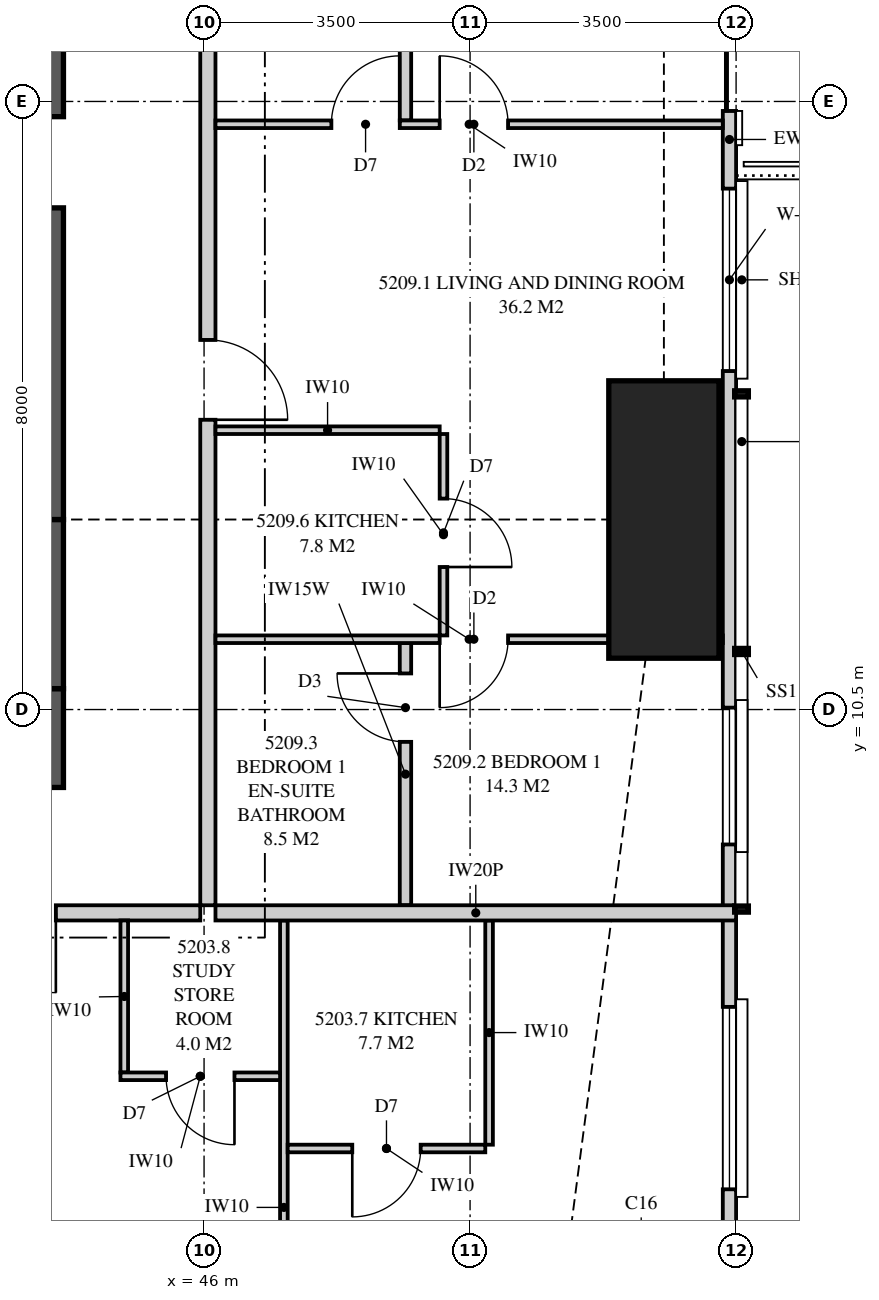
"""IFC4 building model, lengths in metres.
Left out: names, types, materials, properties, quantities, classifications, styles, units other than length and angle.
Written with IfcOpenShell. Run it as: python <this file> out.ifc"""

import sys

from ifc_helpers import new_model, si_unit, direction, frame, frame_2d, origin, origin_2d, place, context, subcontext, project, spatial, polyline, rectangle, outline, extrude, element, fill, save


model = new_model("IFC4")
c1 = context("Model", 3, precision=1e-05, world=origin(), true_north=direction((0.0, 1.0)))
c2 = subcontext(c1, "Body", "Model", "MODEL_VIEW")
j1 = project(units=[si_unit("LENGTHUNIT", "METRE"), si_unit("PLANEANGLEUNIT", "RADIAN")], contexts=[c1])
p1 = place(None, origin())
s1 = spatial("IfcSite", under=j1, at=p1, CompositionType="ELEMENT")
p2 = place(p1, origin())
s2 = spatial("IfcBuilding", under=s1, at=p2, CompositionType="ELEMENT")
p3 = place(p2, frame((0.0, 0.0, 191.2)))
s3 = spatial("IfcBuildingStorey", under=s2, at=p3, CompositionType="ELEMENT", Elevation=191.2)
p4 = place(p3, frame((52.05, 13.0, 0.0), z_axis=(0.0, 0.0, 1.0), x_axis=(1.0, 0.0, 0.0)))
e1 = element("IfcColumn", 1, at=p4, inside=s3, PredefinedType="COLUMN", context=c2, shape_type="SweptSolid", body=[
    extrude(rectangle(XDim=1.45, YDim=3.65, at=origin_2d()), origin(), (0.0, 0.0, 1.0), 3.35),
])
p5 = place(p3, frame((35.9, 10.125, 0.0), z_axis=(0.0, 0.0, 1.0), x_axis=(1.0, 0.0, 0.0)))
e2 = element("IfcWall", 2, at=p5, inside=s3, PredefinedType="SHEAR", context=c2, shape_type="SweptSolid", body=[
    extrude(rectangle(XDim=8.25, YDim=1.3, at=frame_2d((4.125, 0.0))), origin(), (0.0, 0.0, 1.0), 3.35),
])
p6 = place(p5, frame((2.7, 0.0, 0.0)))
e3 = element("IfcOpeningElement", 3, at=p6, cuts=e2, PredefinedType="OPENING", context=c2, shape_type="SweptSolid", body=[
    extrude(rectangle(XDim=1.0, YDim=2.1, at=frame_2d((0.5, 1.05))), frame((0.0, 0.66, 0.0), z_axis=(0.0, -1.0, 0.0), x_axis=(1.0, 0.0, 0.0)), (0.0, 0.0, 1.0), 1.32),
])
p7 = place(p3, frame((43.8, 10.775, 0.0), z_axis=(0.0, 0.0, 1.0), x_axis=(0.0, 1.0, 0.0)))
e4 = element("IfcWall", 4, at=p7, inside=s3, PredefinedType="SHEAR", context=c2, shape_type="SweptSolid", body=[
    extrude(rectangle(XDim=2.225, YDim=0.7, at=frame_2d((1.113, 0.0))), origin(), (0.0, 0.0, 1.0), 3.35),
])
p8 = place(p3, frame((43.8, 13.0, 0.0), z_axis=(0.0, 0.0, 1.0), x_axis=(0.0, 1.0, 0.0)))
e5 = element("IfcWall", 5, at=p8, inside=s3, PredefinedType="SHEAR", context=c2, shape_type="SweptSolid", body=[
    extrude(rectangle(XDim=6.3, YDim=0.7, at=frame_2d((3.15, 0.0))), origin(), (0.0, 0.0, 1.0), 3.35),
])
p9 = place(p8, frame((4.1, 0.0, 0.0)))
e6 = element("IfcOpeningElement", 6, at=p9, cuts=e5, PredefinedType="OPENING", context=c2, shape_type="SweptSolid", body=[
    extrude(rectangle(XDim=1.2, YDim=2.2, at=frame_2d((0.6, 1.1))), frame((0.0, 0.36, 0.0), z_axis=(0.0, -1.0, 0.0), x_axis=(1.0, 0.0, 0.0)), (0.0, 0.0, 1.0), 0.72),
])
p10 = place(p3, frame((52.913, 3.051, 0.0), z_axis=(0.0, 0.0, 1.0), x_axis=(0.0, 1.0, 0.0)))
e7 = element("IfcWall", 7, at=p10, inside=s3, PredefinedType="SOLIDWALL", context=c2, shape_type="SweptSolid", body=[
    extrude(outline(polyline([(0.0, 0.0), (29.897, 0.0), (29.897, 3.11), (22.167, 3.11), (22.167, 2.15), (22.074, 2.15), (22.074, 3.11), (21.949, 3.11), (21.949, 2.15), (9.949, 2.15), (9.949, 3.11), (9.847, 3.11), (9.847, 2.15), (9.706, 2.15), (9.706, 3.11), (0.0, 3.11), (0.0, 0.0)])), frame((0.0, 0.087, 0.0), z_axis=(0.0, -1.0, 0.0), x_axis=(1.0, 0.0, 0.0)), (0.0, 0.0, 1.0), 0.175),
])
p11 = place(p10, frame((1.137, 0.0, 0.4)))
e8 = element("IfcOpeningElement", 8, at=p11, cuts=e7, PredefinedType="OPENING", context=c2, shape_type="SweptSolid", body=[
    extrude(rectangle(XDim=2.4, YDim=1.7, at=frame_2d((1.2, 0.85))), frame((0.0, 0.097, 0.0), z_axis=(0.0, -1.0, 0.0), x_axis=(1.0, 0.0, 0.0)), (0.0, 0.0, 1.0), 0.195),
])
p12 = place(p10, frame((5.674, 0.0, 0.4)))
e9 = element("IfcOpeningElement", 9, at=p12, cuts=e7, PredefinedType="OPENING", context=c2, shape_type="SweptSolid", body=[
    extrude(rectangle(XDim=1.8, YDim=1.7, at=frame_2d((0.9, 0.85))), frame((0.0, 0.097, 0.0), z_axis=(0.0, -1.0, 0.0), x_axis=(1.0, 0.0, 0.0)), (0.0, 0.0, 1.0), 0.195),
])
p13 = place(p10, frame((11.902, 0.0, 0.4)))
e10 = element("IfcOpeningElement", 10, at=p13, cuts=e7, PredefinedType="OPENING", context=c2, shape_type="SweptSolid", body=[
    extrude(rectangle(XDim=2.4, YDim=1.7, at=frame_2d((1.2, 0.85))), frame((0.0, 0.097, 0.0), z_axis=(0.0, -1.0, 0.0), x_axis=(1.0, 0.0, 0.0)), (0.0, 0.0, 1.0), 0.195),
])
p14 = place(p10, frame((15.324, 0.0, 0.0)))
e11 = element("IfcOpeningElement", 11, at=p14, cuts=e7, PredefinedType="OPENING", context=c2, shape_type="SweptSolid", body=[
    extrude(rectangle(XDim=1.8, YDim=2.1, at=frame_2d((0.9, 1.05))), frame((0.0, 0.097, 0.0), z_axis=(0.0, -1.0, 0.0), x_axis=(1.0, 0.0, 0.0)), (0.0, 0.0, 1.0), 0.195),
])
p15 = place(p10, frame((23.874, 0.0, 0.4)))
e12 = element("IfcOpeningElement", 12, at=p15, cuts=e7, PredefinedType="OPENING", context=c2, shape_type="SweptSolid", body=[
    extrude(rectangle(XDim=1.8, YDim=1.7, at=frame_2d((0.9, 0.85))), frame((0.0, 0.097, 0.0), z_axis=(0.0, -1.0, 0.0), x_axis=(1.0, 0.0, 0.0)), (0.0, 0.0, 1.0), 0.195),
])
p16 = place(p10, frame((26.871, 0.0, 0.4)))
e13 = element("IfcOpeningElement", 13, at=p16, cuts=e7, PredefinedType="OPENING", context=c2, shape_type="SweptSolid", body=[
    extrude(rectangle(XDim=1.8, YDim=1.7, at=frame_2d((0.9, 0.85))), frame((0.0, 0.097, 0.0), z_axis=(0.0, -1.0, 0.0), x_axis=(1.0, 0.0, 0.0)), (0.0, 0.0, 1.0), 0.195),
])
p17 = place(p3, frame((34.1, 7.825, 0.0), z_axis=(0.0, 0.0, 1.0), x_axis=(1.0, 0.0, 0.0)))
e14 = element("IfcWall", 14, at=p17, inside=s3, PredefinedType="PARTITIONING", context=c2, shape_type="SweptSolid", body=[
    extrude(outline(polyline([(0.0, 0.0), (11.85, 0.0), (11.85, 3.11), (8.987, 3.11), (8.987, 2.541), (8.312, 2.541), (8.312, 3.11), (0.0, 3.11), (0.0, 0.0)])), frame((0.0, 0.1, 0.0), z_axis=(0.0, -1.0, 0.0), x_axis=(1.0, 0.0, 0.0)), (0.0, 0.0, 1.0), 0.2),
])
p18 = place(p17, frame((8.9, 0.0, 0.0)))
e15 = element("IfcOpeningElement", 15, at=p18, cuts=e14, PredefinedType="OPENING", context=c2, shape_type="SweptSolid", body=[
    extrude(rectangle(XDim=1.05, YDim=2.2, at=frame_2d((0.525, 1.1))), frame((0.0, 0.11, 0.0), z_axis=(0.0, -1.0, 0.0), x_axis=(1.0, 0.0, 0.0)), (0.0, 0.0, 1.0), 0.22),
])
p19 = place(p3, frame((47.05, 0.175, 0.0), z_axis=(0.0, 0.0, 1.0), x_axis=(0.0, 1.0, 0.0)))
e16 = element("IfcWall", 16, at=p19, inside=s3, PredefinedType="PARTITIONING", context=c2, shape_type="SweptSolid", body=[
    extrude(outline(polyline([(0.0, 0.0), (7.55, 0.0), (7.55, 3.11), (2.409, 3.11), (2.409, 2.15), (0.663, 2.15), (0.663, 3.11), (0.0, 3.11), (0.0, 0.0)])), frame((0.0, 0.05, 0.0), z_axis=(0.0, -1.0, 0.0), x_axis=(1.0, 0.0, 0.0)), (0.0, 0.0, 1.0), 0.1),
])
p20 = place(p19, frame((1.825, 0.0, 0.0)))
e17 = element("IfcOpeningElement", 17, at=p20, cuts=e16, PredefinedType="OPENING", context=c2, shape_type="SweptSolid", body=[
    extrude(rectangle(XDim=0.9, YDim=2.1, at=frame_2d((0.45, 1.05))), frame((0.0, 0.06, 0.0), z_axis=(0.0, -1.0, 0.0), x_axis=(1.0, 0.0, 0.0)), (0.0, 0.0, 1.0), 0.12),
])
p21 = place(p3, frame((47.1, 4.725, 0.0), z_axis=(0.0, 0.0, 1.0), x_axis=(1.0, 0.0, 0.0)))
e18 = element("IfcWall", 18, at=p21, inside=s3, PredefinedType="PARTITIONING", context=c2, shape_type="SweptSolid", body=[
    extrude(rectangle(XDim=2.6, YDim=0.1, at=frame_2d((1.3, 0.0))), origin(), (0.0, 0.0, 1.0), 3.11),
])
p22 = place(p21, frame((0.85, 0.0, 0.0)))
e19 = element("IfcOpeningElement", 19, at=p22, cuts=e18, PredefinedType="OPENING", context=c2, shape_type="SweptSolid", body=[
    extrude(rectangle(XDim=0.9, YDim=2.1, at=frame_2d((0.45, 1.05))), frame((0.0, 0.06, 0.0), z_axis=(0.0, -1.0, 0.0), x_axis=(1.0, 0.0, 0.0)), (0.0, 0.0, 1.0), 0.12),
])
p23 = place(p3, frame((49.75, 4.775, 0.0), z_axis=(0.0, 0.0, 1.0), x_axis=(0.0, 1.0, 0.0)))
e20 = element("IfcWall", 20, at=p23, inside=s3, PredefinedType="PARTITIONING", context=c2, shape_type="SweptSolid", body=[
    extrude(rectangle(XDim=2.95, YDim=0.1, at=frame_2d((1.475, 0.0))), origin(), (0.0, 0.0, 1.0), 3.11),
])
p24 = place(p3, frame((46.15, 7.825, 0.0), z_axis=(0.0, 0.0, 1.0), x_axis=(1.0, 0.0, 0.0)))
e21 = element("IfcWall", 21, at=p24, inside=s3, PredefinedType="PARTITIONING", context=c2, shape_type="SweptSolid", body=[
    extrude(outline(polyline([(0.0, 0.0), (6.85, 0.0), (6.85, 3.11), (6.138, 3.11), (6.138, 2.15), (4.303, 2.15), (4.303, 3.11), (0.0, 3.11), (0.0, 0.0)])), frame((0.0, 0.1, 0.0), z_axis=(0.0, -1.0, 0.0), x_axis=(1.0, 0.0, 0.0)), (0.0, 0.0, 1.0), 0.2),
])
p25 = place(p3, frame((46.05, 7.925, 0.0), z_axis=(0.0, 0.0, 1.0), x_axis=(0.0, 1.0, 0.0)))
e22 = element("IfcWall", 22, at=p25, inside=s3, PredefinedType="PARTITIONING", context=c2, shape_type="SweptSolid", body=[
    extrude(outline(polyline([(0.0, 0.0), (13.775, 0.0), (13.775, 3.11), (5.412, 3.11), (5.412, 2.541), (4.738, 2.541), (4.738, 3.11), (0.0, 3.11), (0.0, 0.0)])), frame((0.0, 0.1, 0.0), z_axis=(0.0, -1.0, 0.0), x_axis=(1.0, 0.0, 0.0)), (0.0, 0.0, 1.0), 0.2),
])
p26 = place(p25, frame((6.387, 0.0, 0.0)))
e23 = element("IfcOpeningElement", 23, at=p26, cuts=e22, PredefinedType="OPENING", context=c2, shape_type="SweptSolid", body=[
    extrude(rectangle(XDim=1.05, YDim=2.2, at=frame_2d((0.525, 1.1))), frame((0.0, 0.11, 0.0), z_axis=(0.0, -1.0, 0.0), x_axis=(1.0, 0.0, 0.0)), (0.0, 0.0, 1.0), 0.22),
])
p27 = place(p3, frame((52.825, 11.425, 0.0), z_axis=(0.0, 0.0, 1.0), x_axis=(-1.0, 0.0, 0.0)))
e24 = element("IfcWall", 24, at=p27, inside=s3, PredefinedType="PARTITIONING", context=c2, shape_type="SweptSolid", body=[
    extrude(outline(polyline([(0.0, 0.0), (6.675, 0.0), (6.675, 3.11), (1.849, 3.11), (1.849, 2.15), (0.115, 2.15), (0.115, 3.11), (0.0, 3.11), (0.0, 0.0)])), frame((0.0, 0.05, 0.0), z_axis=(0.0, -1.0, 0.0), x_axis=(1.0, 0.0, 0.0)), (0.0, 0.0, 1.0), 0.1),
])
p28 = place(p27, frame((2.825, 0.0, 0.0)))
e25 = element("IfcOpeningElement", 25, at=p28, cuts=e24, PredefinedType="OPENING", context=c2, shape_type="SweptSolid", body=[
    extrude(rectangle(XDim=0.9, YDim=2.1, at=frame_2d((0.45, 1.05))), frame((0.0, 0.06, 0.0), z_axis=(0.0, -1.0, 0.0), x_axis=(1.0, 0.0, 0.0)), (0.0, 0.0, 1.0), 0.12),
])
p29 = place(p3, frame((52.825, 18.2, 0.0), z_axis=(0.0, 0.0, 1.0), x_axis=(-1.0, 0.0, 0.0)))
e26 = element("IfcWall", 26, at=p29, inside=s3, PredefinedType="PARTITIONING", context=c2, shape_type="SweptSolid", body=[
    extrude(outline(polyline([(0.0, 0.0), (6.675, 0.0), (6.675, 3.11), (1.635, 3.11), (1.635, 2.15), (0.0, 2.15), (0.0, 3.11), (0.0, 0.0)])), frame((0.0, 0.05, 0.0), z_axis=(0.0, -1.0, 0.0), x_axis=(1.0, 0.0, 0.0)), (0.0, 0.0, 1.0), 0.1),
])
p30 = place(p29, frame((2.825, 0.0, 0.0)))
e27 = element("IfcOpeningElement", 27, at=p30, cuts=e26, PredefinedType="OPENING", context=c2, shape_type="SweptSolid", body=[
    extrude(rectangle(XDim=0.9, YDim=2.1, at=frame_2d((0.45, 1.05))), frame((0.0, 0.06, 0.0), z_axis=(0.0, -1.0, 0.0), x_axis=(1.0, 0.0, 0.0)), (0.0, 0.0, 1.0), 0.12),
])
p31 = place(p29, frame((4.25, 0.0, 0.0)))
e28 = element("IfcOpeningElement", 28, at=p31, cuts=e26, PredefinedType="OPENING", context=c2, shape_type="SweptSolid", body=[
    extrude(rectangle(XDim=0.9, YDim=2.1, at=frame_2d((0.45, 1.05))), frame((0.0, 0.06, 0.0), z_axis=(0.0, -1.0, 0.0), x_axis=(1.0, 0.0, 0.0)), (0.0, 0.0, 1.0), 0.12),
])
p32 = place(p3, frame((48.65, 7.925, 0.0), z_axis=(0.0, 0.0, 1.0), x_axis=(0.0, 1.0, 0.0)))
e29 = element("IfcWall", 29, at=p32, inside=s3, PredefinedType="PLUMBINGWALL", context=c2, shape_type="SweptSolid", body=[
    extrude(rectangle(XDim=3.45, YDim=0.15, at=frame_2d((1.725, 0.0))), origin(), (0.0, 0.0, 1.0), 3.11),
])
p33 = place(p32, frame((2.15, 0.0, 0.0)))
e30 = element("IfcOpeningElement", 30, at=p33, cuts=e29, PredefinedType="OPENING", context=c2, shape_type="SweptSolid", body=[
    extrude(rectangle(XDim=0.9, YDim=2.1, at=frame_2d((0.45, 1.05))), frame((0.0, 0.085, 0.0), z_axis=(0.0, -1.0, 0.0), x_axis=(1.0, 0.0, 0.0)), (0.0, 0.0, 1.0), 0.17),
])
p34 = place(p3, frame((48.65, 18.25, 0.0), z_axis=(0.0, 0.0, 1.0), x_axis=(0.0, 1.0, 0.0)))
e31 = element("IfcWall", 31, at=p34, inside=s3, PredefinedType="PLUMBINGWALL", context=c2, shape_type="SweptSolid", body=[
    extrude(rectangle(XDim=3.45, YDim=0.15, at=frame_2d((1.725, 0.0))), origin(), (0.0, 0.0, 1.0), 3.11),
])
p35 = place(p3, frame((49.15, 11.475, 0.0), z_axis=(0.0, 0.0, 1.0), x_axis=(0.0, 1.0, 0.0)))
e32 = element("IfcWall", 32, at=p35, inside=s3, PredefinedType="PARTITIONING", context=c2, shape_type="SweptSolid", body=[
    extrude(outline(polyline([(0.0, 0.0), (2.65, 0.0), (2.65, 3.11), (1.812, 3.11), (1.812, 2.541), (1.238, 2.541), (1.238, 3.11), (0.0, 3.11), (0.0, 0.0)])), frame((0.0, 0.05, 0.0), z_axis=(0.0, -1.0, 0.0), x_axis=(1.0, 0.0, 0.0)), (0.0, 0.0, 1.0), 0.1),
])
p36 = place(p35, frame((0.9, 0.0, 0.0)))
e33 = element("IfcOpeningElement", 33, at=p36, cuts=e32, PredefinedType="OPENING", context=c2, shape_type="SweptSolid", body=[
    extrude(rectangle(XDim=0.9, YDim=2.1, at=frame_2d((0.45, 1.05))), frame((0.0, 0.06, 0.0), z_axis=(0.0, -1.0, 0.0), x_axis=(1.0, 0.0, 0.0)), (0.0, 0.0, 1.0), 0.12),
])
p37 = place(p3, frame((49.1, 14.175, 0.0), z_axis=(0.0, 0.0, 1.0), x_axis=(-1.0, 0.0, 0.0)))
e34 = element("IfcWall", 34, at=p37, inside=s3, PredefinedType="PARTITIONING", context=c2, shape_type="SweptSolid", body=[
    extrude(rectangle(XDim=2.95, YDim=0.1, at=frame_2d((1.475, 0.0))), origin(), (0.0, 0.0, 1.0), 3.11),
])
p38 = place(p3, frame((47.0, 5.675, 0.0), z_axis=(0.0, 0.0, 1.0), x_axis=(-1.0, 0.0, 0.0)))
e35 = element("IfcWall", 35, at=p38, inside=s3, PredefinedType="PARTITIONING", context=c2, shape_type="SweptSolid", body=[
    extrude(rectangle(XDim=2.1, YDim=0.1, at=frame_2d((1.05, 0.0))), origin(), (0.0, 0.0, 1.0), 3.11),
])
p39 = place(p38, frame((0.6, 0.0, 0.0)))
e36 = element("IfcOpeningElement", 36, at=p39, cuts=e35, PredefinedType="OPENING", context=c2, shape_type="SweptSolid", body=[
    extrude(rectangle(XDim=0.9, YDim=2.1, at=frame_2d((0.45, 1.05))), frame((0.0, 0.06, 0.0), z_axis=(0.0, -1.0, 0.0), x_axis=(1.0, 0.0, 0.0)), (0.0, 0.0, 1.0), 0.12),
])
p40 = place(p3, frame((44.95, 7.725, 0.0), z_axis=(0.0, 0.0, 1.0), x_axis=(0.0, -1.0, 0.0)))
e37 = element("IfcWall", 37, at=p40, inside=s3, PredefinedType="PARTITIONING", context=c2, shape_type="SweptSolid", body=[
    extrude(rectangle(XDim=2.0, YDim=0.1, at=frame_2d((1.0, 0.0))), origin(), (0.0, 0.0, 1.0), 3.11),
])
p41 = place(p11, origin())
e38 = element("IfcWindow", 38, at=p41, inside=s3, PartitioningType="SINGLE_PANEL", PredefinedType="WINDOW", context=c2, shape_type="SweptSolid", body=[
    extrude(rectangle(XDim=2.4, YDim=1.7, at=frame_2d((1.2, 0.85))), frame((0.0, 0.03, 0.0), z_axis=(0.0, -1.0, 0.0), x_axis=(1.0, 0.0, 0.0)), (0.0, 0.0, 1.0), 0.06),
])
fill(e8, e38)
p42 = place(p12, origin())
e39 = element("IfcWindow", 39, at=p42, inside=s3, PartitioningType="SINGLE_PANEL", PredefinedType="WINDOW", context=c2, shape_type="SweptSolid", body=[
    extrude(rectangle(XDim=1.8, YDim=1.7, at=frame_2d((0.9, 0.85))), frame((0.0, 0.03, 0.0), z_axis=(0.0, -1.0, 0.0), x_axis=(1.0, 0.0, 0.0)), (0.0, 0.0, 1.0), 0.06),
])
fill(e9, e39)
p43 = place(p13, origin())
e40 = element("IfcWindow", 40, at=p43, inside=s3, PartitioningType="SINGLE_PANEL", PredefinedType="WINDOW", context=c2, shape_type="SweptSolid", body=[
    extrude(rectangle(XDim=2.4, YDim=1.7, at=frame_2d((1.2, 0.85))), frame((0.0, 0.03, 0.0), z_axis=(0.0, -1.0, 0.0), x_axis=(1.0, 0.0, 0.0)), (0.0, 0.0, 1.0), 0.06),
])
fill(e10, e40)
p44 = place(p14, origin())
e41 = element("IfcDoor", 41, at=p44, inside=s3, OperationType="SLIDING_TO_LEFT", PredefinedType="DOOR", context=c2, shape_type="SweptSolid", body=[
    extrude(rectangle(XDim=1.8, YDim=2.1, at=frame_2d((0.9, 1.05))), frame((0.0, 0.025, 0.0), z_axis=(0.0, -1.0, 0.0), x_axis=(1.0, 0.0, 0.0)), (0.0, 0.0, 1.0), 0.05),
])
fill(e11, e41)
p45 = place(p18, frame((1.05, 0.0, 0.0), z_axis=(0.0, 0.0, 1.0), x_axis=(-1.0, 0.0, 0.0)))
e42 = element("IfcDoor", 42, at=p45, inside=s3, OperationType="SINGLE_SWING_LEFT", PredefinedType="DOOR", context=c2, shape_type="SweptSolid", body=[
    extrude(rectangle(XDim=1.05, YDim=2.2, at=frame_2d((0.525, 1.1))), frame((0.0, 0.025, 0.0), z_axis=(0.0, -1.0, 0.0), x_axis=(1.0, 0.0, 0.0)), (0.0, 0.0, 1.0), 0.05),
])
fill(e15, e42)
p46 = place(p22, frame((0.9, 0.0, 0.0), z_axis=(0.0, 0.0, 1.0), x_axis=(-1.0, 0.0, 0.0)))
e43 = element("IfcDoor", 43, at=p46, inside=s3, OperationType="SINGLE_SWING_RIGHT", PredefinedType="DOOR", context=c2, shape_type="SweptSolid", body=[
    extrude(rectangle(XDim=0.9, YDim=2.1, at=frame_2d((0.45, 1.05))), frame((0.0, 0.025, 0.0), z_axis=(0.0, -1.0, 0.0), x_axis=(1.0, 0.0, 0.0)), (0.0, 0.0, 1.0), 0.05),
])
fill(e19, e43)
p47 = place(p26, frame((1.05, 0.0, 0.0), z_axis=(0.0, 0.0, 1.0), x_axis=(-1.0, 0.0, 0.0)))
e44 = element("IfcDoor", 44, at=p47, inside=s3, OperationType="SINGLE_SWING_RIGHT", PredefinedType="DOOR", context=c2, shape_type="SweptSolid", body=[
    extrude(rectangle(XDim=1.05, YDim=2.2, at=frame_2d((0.525, 1.1))), frame((0.0, 0.025, 0.0), z_axis=(0.0, -1.0, 0.0), x_axis=(1.0, 0.0, 0.0)), (0.0, 0.0, 1.0), 0.05),
])
fill(e23, e44)
p48 = place(p28, origin())
e45 = element("IfcDoor", 45, at=p48, inside=s3, OperationType="SINGLE_SWING_RIGHT", PredefinedType="DOOR", context=c2, shape_type="SweptSolid", body=[
    extrude(rectangle(XDim=0.9, YDim=2.1, at=frame_2d((0.45, 1.05))), frame((0.0, 0.025, 0.0), z_axis=(0.0, -1.0, 0.0), x_axis=(1.0, 0.0, 0.0)), (0.0, 0.0, 1.0), 0.05),
])
fill(e25, e45)
p49 = place(p33, origin())
e46 = element("IfcDoor", 46, at=p49, inside=s3, OperationType="SINGLE_SWING_RIGHT", PredefinedType="DOOR", context=c2, shape_type="SweptSolid", body=[
    extrude(rectangle(XDim=0.9, YDim=2.1, at=frame_2d((0.45, 1.05))), frame((0.0, 0.025, 0.0), z_axis=(0.0, -1.0, 0.0), x_axis=(1.0, 0.0, 0.0)), (0.0, 0.0, 1.0), 0.05),
])
fill(e30, e46)
p50 = place(p30, frame((0.9, 0.0, 0.0), z_axis=(0.0, 0.0, 1.0), x_axis=(-1.0, 0.0, 0.0)))
e47 = element("IfcDoor", 47, at=p50, inside=s3, OperationType="SINGLE_SWING_LEFT", PredefinedType="DOOR", context=c2, shape_type="SweptSolid", body=[
    extrude(rectangle(XDim=0.9, YDim=2.1, at=frame_2d((0.45, 1.05))), frame((0.0, 0.025, 0.0), z_axis=(0.0, -1.0, 0.0), x_axis=(1.0, 0.0, 0.0)), (0.0, 0.0, 1.0), 0.05),
])
fill(e27, e47)
p51 = place(p31, frame((0.9, 0.0, 0.0), z_axis=(0.0, 0.0, 1.0), x_axis=(-1.0, 0.0, 0.0)))
e48 = element("IfcDoor", 48, at=p51, inside=s3, OperationType="SINGLE_SWING_RIGHT", PredefinedType="DOOR", context=c2, shape_type="SweptSolid", body=[
    extrude(rectangle(XDim=0.9, YDim=2.1, at=frame_2d((0.45, 1.05))), frame((0.0, 0.025, 0.0), z_axis=(0.0, -1.0, 0.0), x_axis=(1.0, 0.0, 0.0)), (0.0, 0.0, 1.0), 0.05),
])
fill(e28, e48)
p52 = place(p36, frame((0.9, 0.0, 0.0), z_axis=(0.0, 0.0, 1.0), x_axis=(-1.0, 0.0, 0.0)))
e49 = element("IfcDoor", 49, at=p52, inside=s3, OperationType="SINGLE_SWING_RIGHT", PredefinedType="DOOR", context=c2, shape_type="SweptSolid", body=[
    extrude(rectangle(XDim=0.9, YDim=2.1, at=frame_2d((0.45, 1.05))), frame((0.0, 0.025, 0.0), z_axis=(0.0, -1.0, 0.0), x_axis=(1.0, 0.0, 0.0)), (0.0, 0.0, 1.0), 0.05),
])
fill(e33, e49)
p53 = place(p39, origin())
e50 = element("IfcDoor", 50, at=p53, inside=s3, OperationType="SINGLE_SWING_LEFT", PredefinedType="DOOR", context=c2, shape_type="SweptSolid", body=[
    extrude(rectangle(XDim=0.9, YDim=2.1, at=frame_2d((0.45, 1.05))), frame((0.0, 0.025, 0.0), z_axis=(0.0, -1.0, 0.0), x_axis=(1.0, 0.0, 0.0)), (0.0, 0.0, 1.0), 0.05),
])
fill(e36, e50)
save(model, sys.argv[1])
